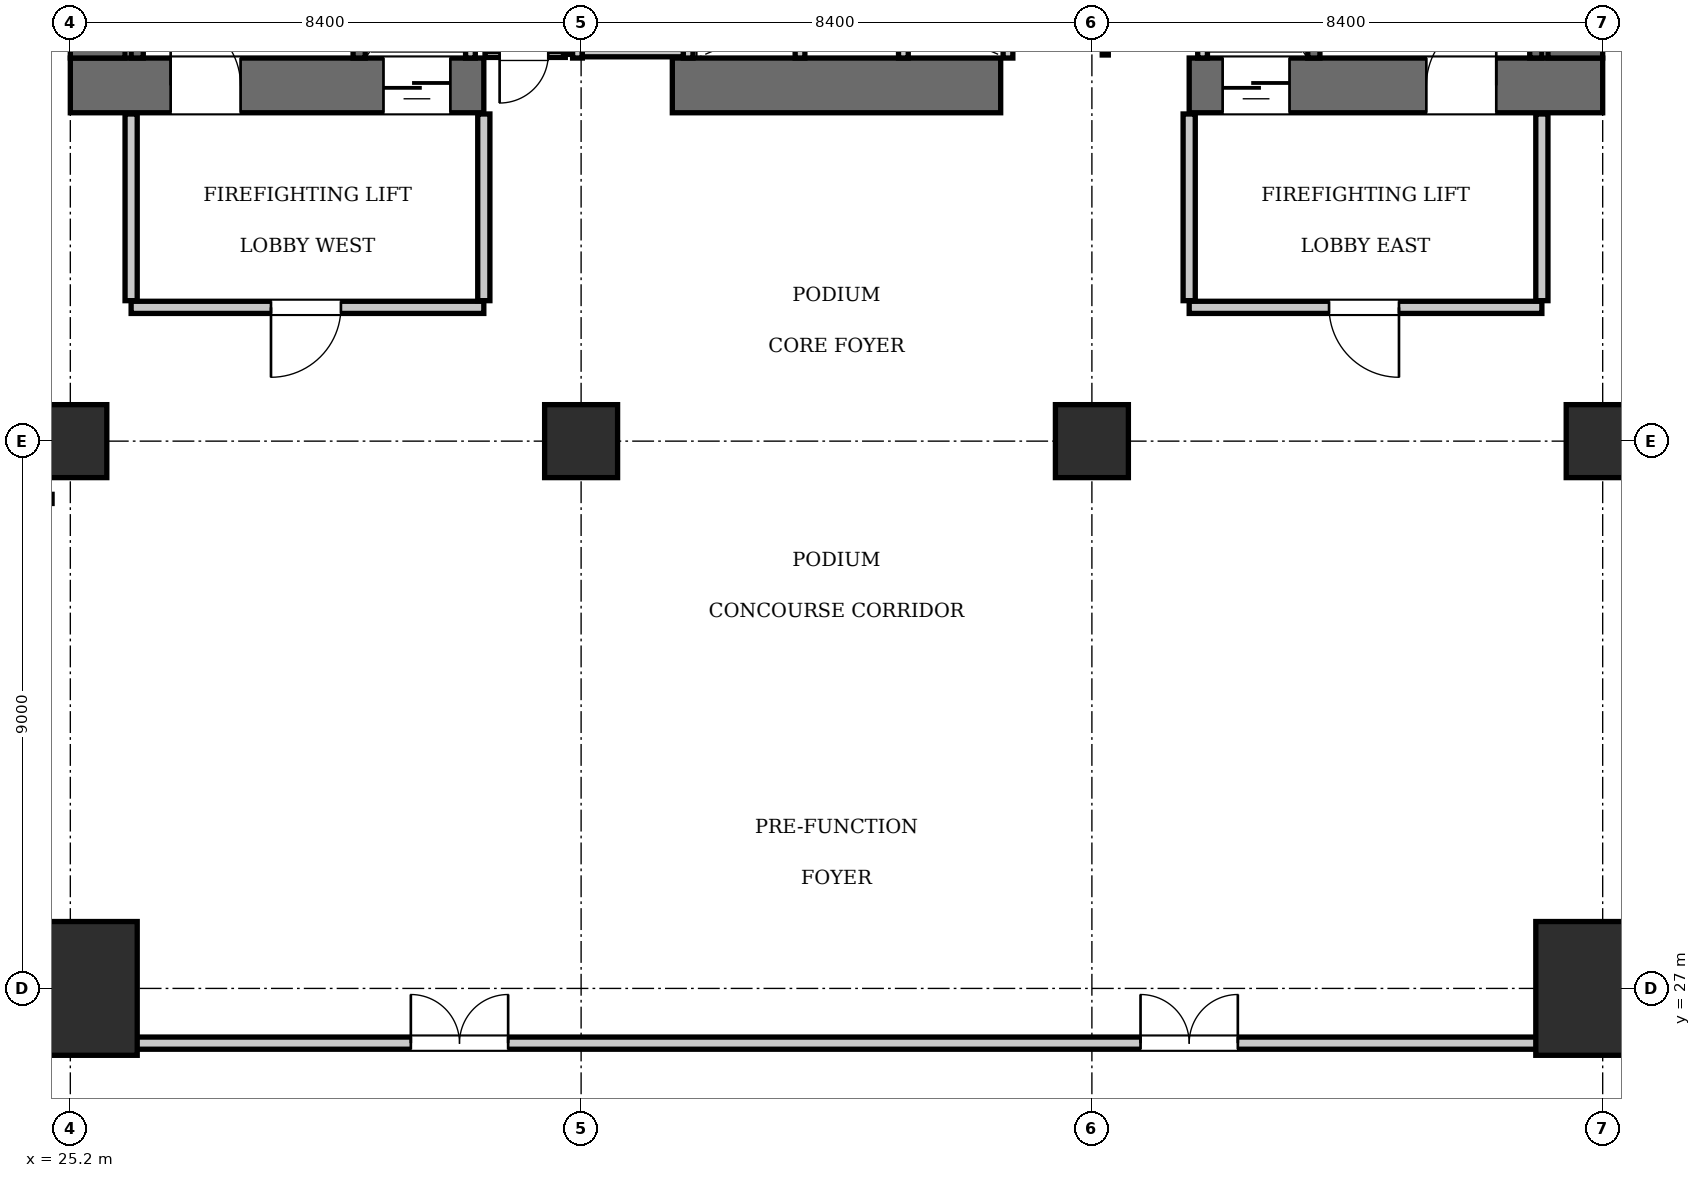
"""IFC4 building model, lengths in metres.
Left out: names, types, materials, properties, quantities, classifications, styles, units other than length and angle.
Written with IfcOpenShell. Run it as: python <this file> out.ifc"""

import sys

from ifc_helpers import new_model, si_unit, direction, frame, frame_2d, origin, origin_2d, place, context, subcontext, project, spatial, rectangle, extrude, element, fill, save


model = new_model("IFC4")
c1 = context("Model", 3, precision=1e-05, world=origin(), true_north=direction((0.0, 1.0)))
c2 = subcontext(c1, "Body", "Model", "MODEL_VIEW")
j1 = project(units=[si_unit("LENGTHUNIT", "METRE"), si_unit("PLANEANGLEUNIT", "RADIAN")], contexts=[c1])
p1 = place(None, origin())
s1 = spatial("IfcSite", under=j1, at=p1, CompositionType="ELEMENT")
p2 = place(p1, origin())
s2 = spatial("IfcBuilding", under=s1, at=p2, CompositionType="ELEMENT")
p3 = place(p2, frame((0.0, 0.0, 5.6)))
s3 = spatial("IfcBuildingStorey", under=s2, at=p3, CompositionType="ELEMENT", Elevation=5.6)
for number, where, z_axis, x_axis in (
    (1, (25.2, 27.0, 0.0), (0.0, 0.0, 1.0), (1.0, 0.0, 0.0)),
    (2, (50.4, 27.0, 0.0), (0.0, 0.0, 1.0), (1.0, 0.0, 0.0)),
):
    element("IfcColumn", number, at=place(p3, frame(where, z_axis=z_axis, x_axis=x_axis)), inside=s3, PredefinedType="COLUMN", context=c2, shape_type="SweptSolid", body=[
        extrude(rectangle(XDim=2.2, YDim=2.2, at=origin_2d()), origin(), (0.0, 0.0, 1.0), 5.25),
    ])
p4 = place(p3, frame((25.2, 41.85, 0.0), z_axis=(0.0, 0.0, 1.0), x_axis=(1.0, 0.0, 0.0)))
e3 = element("IfcWall", 3, at=p4, inside=s3, PredefinedType="SHEAR", context=c2, shape_type="SweptSolid", body=[
    extrude(rectangle(XDim=6.8, YDim=0.9, at=frame_2d((3.4, 0.0))), origin(), (0.0, 0.0, 1.0), 5.25),
])
p5 = place(p4, frame((1.65, 0.0, 0.0)))
e4 = element("IfcOpeningElement", 4, at=p5, cuts=e3, PredefinedType="OPENING", context=c2, shape_type="SweptSolid", body=[
    extrude(rectangle(XDim=1.15, YDim=2.15, at=frame_2d((0.575, 1.075))), frame((0.0, 0.46, 0.0), z_axis=(0.0, -1.0, 0.0), x_axis=(1.0, 0.0, 0.0)), (0.0, 0.0, 1.0), 0.92),
])
p6 = place(p4, frame((5.15, 0.0, 0.0)))
e5 = element("IfcOpeningElement", 5, at=p6, cuts=e3, PredefinedType="OPENING", context=c2, shape_type="SweptSolid", body=[
    extrude(rectangle(XDim=1.1, YDim=2.2, at=frame_2d((0.55, 1.1))), frame((0.0, 0.46, 0.0), z_axis=(0.0, -1.0, 0.0), x_axis=(1.0, 0.0, 0.0)), (0.0, 0.0, 1.0), 0.92),
])
p7 = place(p3, frame((35.1, 41.85, 0.0), z_axis=(0.0, 0.0, 1.0), x_axis=(1.0, 0.0, 0.0)))
e6 = element("IfcWall", 6, at=p7, inside=s3, PredefinedType="SHEAR", context=c2, shape_type="SweptSolid", body=[
    extrude(rectangle(XDim=5.4, YDim=0.9, at=frame_2d((2.7, 0.0))), origin(), (0.0, 0.0, 1.0), 5.25),
])
p8 = place(p3, frame((43.6, 41.85, 0.0), z_axis=(0.0, 0.0, 1.0), x_axis=(1.0, 0.0, 0.0)))
e7 = element("IfcWall", 7, at=p8, inside=s3, PredefinedType="SHEAR", context=c2, shape_type="SweptSolid", body=[
    extrude(rectangle(XDim=6.8, YDim=0.9, at=frame_2d((3.4, 0.0))), origin(), (0.0, 0.0, 1.0), 5.25),
])
p9 = place(p8, frame((3.9, 0.0, 0.0)))
e8 = element("IfcOpeningElement", 8, at=p9, cuts=e7, PredefinedType="OPENING", context=c2, shape_type="SweptSolid", body=[
    extrude(rectangle(XDim=1.15, YDim=2.15, at=frame_2d((0.575, 1.075))), frame((0.0, 0.46, 0.0), z_axis=(0.0, -1.0, 0.0), x_axis=(1.0, 0.0, 0.0)), (0.0, 0.0, 1.0), 0.92),
])
p10 = place(p8, frame((0.55, 0.0, 0.0)))
e9 = element("IfcOpeningElement", 9, at=p10, cuts=e7, PredefinedType="OPENING", context=c2, shape_type="SweptSolid", body=[
    extrude(rectangle(XDim=1.1, YDim=2.2, at=frame_2d((0.55, 1.1))), frame((0.0, 0.46, 0.0), z_axis=(0.0, -1.0, 0.0), x_axis=(1.0, 0.0, 0.0)), (0.0, 0.0, 1.0), 0.92),
])
for number, where, z_axis, x_axis in (
    (10, (25.65, 42.3, 0.0), (0.0, 0.0, 1.0), (0.0, 1.0, 0.0)),
    (11, (49.95, 42.3, 0.0), (0.0, 0.0, 1.0), (0.0, 1.0, 0.0)),
):
    element("IfcWall", number, at=place(p3, frame(where, z_axis=z_axis, x_axis=x_axis)), inside=s3, PredefinedType="SHEAR", context=c2, shape_type="SweptSolid", body=[
        extrude(rectangle(XDim=1.6, YDim=0.9, at=frame_2d((0.8, 0.0))), origin(), (0.0, 0.0, 1.0), 5.25),
    ])
for number, where, z_axis, x_axis in (
    (12, (25.2, 36.0, 0.0), (0.0, 0.0, 1.0), (1.0, 0.0, 0.0)),
    (13, (33.6, 36.0, 0.0), (0.0, 0.0, 1.0), (1.0, 0.0, 0.0)),
    (14, (42.0, 36.0, 0.0), (0.0, 0.0, 1.0), (1.0, 0.0, 0.0)),
    (15, (50.4, 36.0, 0.0), (0.0, 0.0, 1.0), (1.0, 0.0, 0.0)),
):
    element("IfcColumn", number, at=place(p3, frame(where, z_axis=z_axis, x_axis=x_axis)), inside=s3, PredefinedType="COLUMN", context=c2, shape_type="SweptSolid", body=[
        extrude(rectangle(XDim=1.2, YDim=1.2, at=origin_2d()), origin(), (0.0, 0.0, 1.0), 5.25),
    ])
p11 = place(p3, frame((29.95, 42.3, 0.0), z_axis=(0.0, 0.0, 1.0), x_axis=(0.0, 1.0, 0.0)))
e16 = element("IfcWall", 16, at=p11, inside=s3, PredefinedType="SOLIDWALL", context=c2, shape_type="SweptSolid", body=[
    extrude(rectangle(XDim=8.85, YDim=0.2, at=frame_2d((4.425, 0.0))), origin(), (0.0, 0.0, 1.0), 4.97),
])
p12 = place(p3, frame((26.3, 42.3, 0.0), z_axis=(0.0, 0.0, 1.0), x_axis=(0.0, 1.0, 0.0)))
e17 = element("IfcWall", 17, at=p12, inside=s3, PredefinedType="SOLIDWALL", context=c2, shape_type="SweptSolid", body=[
    extrude(rectangle(XDim=1.58, YDim=0.2, at=frame_2d((0.79, 0.0))), origin(), (0.0, 0.0, 1.0), 4.97),
])
p13 = place(p3, frame((45.65, 42.3, 0.0), z_axis=(0.0, 0.0, 1.0), x_axis=(0.0, 1.0, 0.0)))
e18 = element("IfcWall", 18, at=p13, inside=s3, PredefinedType="SOLIDWALL", context=c2, shape_type="SweptSolid", body=[
    extrude(rectangle(XDim=8.85, YDim=0.2, at=frame_2d((4.425, 0.0))), origin(), (0.0, 0.0, 1.0), 4.97),
])
p14 = place(p3, frame((49.3, 42.3, 0.0), z_axis=(0.0, 0.0, 1.0), x_axis=(0.0, 1.0, 0.0)))
e19 = element("IfcWall", 19, at=p14, inside=s3, PredefinedType="SOLIDWALL", context=c2, shape_type="SweptSolid", body=[
    extrude(rectangle(XDim=1.58, YDim=0.2, at=frame_2d((0.79, 0.0))), origin(), (0.0, 0.0, 1.0), 4.97),
])
for number, where, z_axis, x_axis in (
    (20, (31.78, 42.3, 0.0), (0.0, 0.0, 1.0), (0.0, 1.0, 0.0)),
    (21, (43.82, 42.3, 0.0), (0.0, 0.0, 1.0), (0.0, 1.0, 0.0)),
):
    element("IfcWall", number, at=place(p3, frame(where, z_axis=z_axis, x_axis=x_axis)), inside=s3, PredefinedType="SOLIDWALL", context=c2, shape_type="SweptSolid", body=[
        extrude(rectangle(XDim=2.44, YDim=0.16, at=frame_2d((1.22, 0.0))), origin(), (0.0, 0.0, 1.0), 4.97),
    ])
for number, where, z_axis, x_axis in (
    (22, (37.2, 42.3, 0.0), (0.0, 0.0, 1.0), (0.0, 1.0, 0.0)),
    (23, (38.9, 42.3, 0.0), (0.0, 0.0, 1.0), (0.0, 1.0, 0.0)),
    (24, (40.62, 42.3, 0.0), (0.0, 0.0, 1.0), (0.0, 1.0, 0.0)),
):
    element("IfcWall", number, at=place(p3, frame(where, z_axis=z_axis, x_axis=x_axis)), inside=s3, PredefinedType="SOLIDWALL", context=c2, shape_type="SweptSolid", body=[
        extrude(rectangle(XDim=2.05, YDim=0.16, at=frame_2d((1.025, 0.0))), origin(), (0.0, 0.0, 1.0), 4.97),
    ])
for number, where, z_axis, x_axis in (
    (25, (33.54, 42.3, 0.0), (0.0, 0.0, 1.0), (0.0, 1.0, 0.0)),
    (26, (35.36, 42.3, 0.0), (0.0, 0.0, 1.0), (0.0, 1.0, 0.0)),
):
    element("IfcWall", number, at=place(p3, frame(where, z_axis=z_axis, x_axis=x_axis)), inside=s3, PredefinedType="SOLIDWALL", context=c2, shape_type="SweptSolid", body=[
        extrude(rectangle(XDim=2.1, YDim=0.16, at=frame_2d((1.05, 0.0))), origin(), (0.0, 0.0, 1.0), 4.97),
    ])
p15 = place(p3, frame((33.62, 42.4, 0.0), z_axis=(0.0, 0.0, 1.0), x_axis=(1.0, 0.0, 0.0)))
e27 = element("IfcWall", 27, at=p15, inside=s3, PredefinedType="SOLIDWALL", context=c2, shape_type="SweptSolid", body=[
    extrude(rectangle(XDim=1.66, YDim=0.16, at=frame_2d((0.83, 0.0))), origin(), (0.0, 0.0, 1.0), 4.97),
])
p16 = place(p3, frame((26.2, 38.2, 0.0), z_axis=(0.0, 0.0, 1.0), x_axis=(1.0, 0.0, 0.0)))
e28 = element("IfcWall", 28, at=p16, inside=s3, PredefinedType="PARTITIONING", context=c2, shape_type="SweptSolid", body=[
    extrude(rectangle(XDim=5.8, YDim=0.2, at=frame_2d((2.9, 0.0))), origin(), (0.0, 0.0, 1.0), 4.97),
])
p17 = place(p16, frame((2.3, 0.0, 0.0)))
e29 = element("IfcOpeningElement", 29, at=p17, cuts=e28, PredefinedType="OPENING", context=c2, shape_type="SweptSolid", body=[
    extrude(rectangle(XDim=1.15, YDim=2.15, at=frame_2d((0.575, 1.075))), frame((0.0, 0.11, 0.0), z_axis=(0.0, -1.0, 0.0), x_axis=(1.0, 0.0, 0.0)), (0.0, 0.0, 1.0), 0.22),
])
for number, where, z_axis, x_axis in (
    (30, (26.2, 38.31, 0.0), (0.0, 0.0, 1.0), (0.0, 1.0, 0.0)),
    (31, (32.0, 38.31, 0.0), (0.0, 0.0, 1.0), (0.0, 1.0, 0.0)),
):
    element("IfcWall", number, at=place(p3, frame(where, z_axis=z_axis, x_axis=x_axis)), inside=s3, PredefinedType="PARTITIONING", context=c2, shape_type="SweptSolid", body=[
        extrude(rectangle(XDim=3.07, YDim=0.2, at=frame_2d((1.535, 0.0))), origin(), (0.0, 0.0, 1.0), 4.97),
    ])
p18 = place(p3, frame((43.6, 38.2, 0.0), z_axis=(0.0, 0.0, 1.0), x_axis=(1.0, 0.0, 0.0)))
e32 = element("IfcWall", 32, at=p18, inside=s3, PredefinedType="PARTITIONING", context=c2, shape_type="SweptSolid", body=[
    extrude(rectangle(XDim=5.8, YDim=0.2, at=frame_2d((2.9, 0.0))), origin(), (0.0, 0.0, 1.0), 4.97),
])
p19 = place(p18, frame((2.3, 0.0, 0.0)))
e33 = element("IfcOpeningElement", 33, at=p19, cuts=e32, PredefinedType="OPENING", context=c2, shape_type="SweptSolid", body=[
    extrude(rectangle(XDim=1.15, YDim=2.15, at=frame_2d((0.575, 1.075))), frame((0.0, 0.11, 0.0), z_axis=(0.0, -1.0, 0.0), x_axis=(1.0, 0.0, 0.0)), (0.0, 0.0, 1.0), 0.22),
])
for number, where, z_axis, x_axis in (
    (34, (43.6, 38.31, 0.0), (0.0, 0.0, 1.0), (0.0, 1.0, 0.0)),
    (35, (49.4, 38.31, 0.0), (0.0, 0.0, 1.0), (0.0, 1.0, 0.0)),
):
    element("IfcWall", number, at=place(p3, frame(where, z_axis=z_axis, x_axis=x_axis)), inside=s3, PredefinedType="PARTITIONING", context=c2, shape_type="SweptSolid", body=[
        extrude(rectangle(XDim=3.07, YDim=0.2, at=frame_2d((1.535, 0.0))), origin(), (0.0, 0.0, 1.0), 4.97),
    ])
p20 = place(p3, frame((32.02, 42.36, 0.0), z_axis=(0.0, 0.0, 1.0), x_axis=(1.0, 0.0, 0.0)))
e36 = element("IfcWall", 36, at=p20, inside=s3, PredefinedType="PARTITIONING", context=c2, shape_type="SweptSolid", body=[
    extrude(rectangle(XDim=1.32, YDim=0.1, at=frame_2d((0.66, 0.0))), origin(), (0.0, 0.0, 1.0), 4.97),
])
p21 = place(p20, frame((0.24, 0.0, 0.0)))
e37 = element("IfcOpeningElement", 37, at=p21, cuts=e36, PredefinedType="OPENING", context=c2, shape_type="SweptSolid", body=[
    extrude(rectangle(XDim=0.8, YDim=2.05, at=frame_2d((0.4, 1.025))), frame((0.0, 0.06, 0.0), z_axis=(0.0, -1.0, 0.0), x_axis=(1.0, 0.0, 0.0)), (0.0, 0.0, 1.0), 0.12),
])
p22 = place(p3, frame((33.36, 42.36, 0.0), z_axis=(0.0, 0.0, 1.0), x_axis=(0.0, 1.0, 0.0)))
e38 = element("IfcWall", 38, at=p22, inside=s3, PredefinedType="PARTITIONING", context=c2, shape_type="SweptSolid", body=[
    extrude(rectangle(XDim=2.58, YDim=0.1, at=frame_2d((1.29, 0.0))), origin(), (0.0, 0.0, 1.0), 4.97),
])
p23 = place(p3, frame((42.22, 42.35, 0.0), z_axis=(0.0, 0.0, 1.0), x_axis=(0.0, 1.0, 0.0)))
e39 = element("IfcWall", 39, at=p23, inside=s3, PredefinedType="PARTITIONING", context=c2, shape_type="SweptSolid", body=[
    extrude(rectangle(XDim=2.61, YDim=0.1, at=frame_2d((1.305, 0.0))), origin(), (0.0, 0.0, 1.0), 4.97),
])
p24 = place(p23, frame((0.65, 0.0, 0.0)))
e40 = element("IfcOpeningElement", 40, at=p24, cuts=e39, PredefinedType="OPENING", context=c2, shape_type="SweptSolid", body=[
    extrude(rectangle(XDim=0.8, YDim=2.05, at=frame_2d((0.4, 1.025))), frame((0.0, 0.06, 0.0), z_axis=(0.0, -1.0, 0.0), x_axis=(1.0, 0.0, 0.0)), (0.0, 0.0, 1.0), 0.12),
])
p25 = place(p3, frame((25.8, 26.1, 0.0), z_axis=(0.0, 0.0, 1.0), x_axis=(1.0, 0.0, 0.0)))
e41 = element("IfcWall", 41, at=p25, inside=s3, PredefinedType="PARTITIONING", context=c2, shape_type="SweptSolid", body=[
    extrude(rectangle(XDim=24.0, YDim=0.2, at=frame_2d((12.0, 0.0))), origin(), (0.0, 0.0, 1.0), 4.97),
])
p26 = place(p25, frame((5.0, 0.0, 0.0)))
e42 = element("IfcOpeningElement", 42, at=p26, cuts=e41, PredefinedType="OPENING", context=c2, shape_type="SweptSolid", body=[
    extrude(rectangle(XDim=1.6, YDim=2.3, at=frame_2d((0.8, 1.15))), frame((0.0, 0.11, 0.0), z_axis=(0.0, -1.0, 0.0), x_axis=(1.0, 0.0, 0.0)), (0.0, 0.0, 1.0), 0.22),
])
p27 = place(p25, frame((17.0, 0.0, 0.0)))
e43 = element("IfcOpeningElement", 43, at=p27, cuts=e41, PredefinedType="OPENING", context=c2, shape_type="SweptSolid", body=[
    extrude(rectangle(XDim=1.6, YDim=2.3, at=frame_2d((0.8, 1.15))), frame((0.0, 0.11, 0.0), z_axis=(0.0, -1.0, 0.0), x_axis=(1.0, 0.0, 0.0)), (0.0, 0.0, 1.0), 0.22),
])
p28 = place(p5, origin())
e44 = element("IfcDoor", 44, at=p28, inside=s3, OperationType="SINGLE_SWING_LEFT", PredefinedType="DOOR", context=c2, shape_type="SweptSolid", body=[
    extrude(rectangle(XDim=1.15, YDim=2.15, at=frame_2d((0.575, 1.075))), frame((0.0, 0.025, 0.0), z_axis=(0.0, -1.0, 0.0), x_axis=(1.0, 0.0, 0.0)), (0.0, 0.0, 1.0), 0.05),
])
fill(e4, e44)
p29 = place(p9, origin())
e45 = element("IfcDoor", 45, at=p29, inside=s3, OperationType="SINGLE_SWING_RIGHT", PredefinedType="DOOR", context=c2, shape_type="SweptSolid", body=[
    extrude(rectangle(XDim=1.15, YDim=2.15, at=frame_2d((0.575, 1.075))), frame((0.0, 0.025, 0.0), z_axis=(0.0, -1.0, 0.0), x_axis=(1.0, 0.0, 0.0)), (0.0, 0.0, 1.0), 0.05),
])
fill(e8, e45)
p30 = place(p6, frame((1.1, 0.0, 0.0), z_axis=(0.0, 0.0, 1.0), x_axis=(-1.0, 0.0, 0.0)))
e46 = element("IfcDoor", 46, at=p30, inside=s3, OperationType="SLIDING_TO_LEFT", PredefinedType="DOOR", context=c2, shape_type="SweptSolid", body=[
    extrude(rectangle(XDim=1.1, YDim=2.2, at=frame_2d((0.55, 1.1))), frame((0.0, 0.025, 0.0), z_axis=(0.0, -1.0, 0.0), x_axis=(1.0, 0.0, 0.0)), (0.0, 0.0, 1.0), 0.05),
])
fill(e5, e46)
p31 = place(p10, frame((1.1, 0.0, 0.0), z_axis=(0.0, 0.0, 1.0), x_axis=(-1.0, 0.0, 0.0)))
e47 = element("IfcDoor", 47, at=p31, inside=s3, OperationType="SLIDING_TO_LEFT", PredefinedType="DOOR", context=c2, shape_type="SweptSolid", body=[
    extrude(rectangle(XDim=1.1, YDim=2.2, at=frame_2d((0.55, 1.1))), frame((0.0, 0.025, 0.0), z_axis=(0.0, -1.0, 0.0), x_axis=(1.0, 0.0, 0.0)), (0.0, 0.0, 1.0), 0.05),
])
fill(e9, e47)
p32 = place(p17, frame((1.15, 0.0, 0.0), z_axis=(0.0, 0.0, 1.0), x_axis=(-1.0, 0.0, 0.0)))
e48 = element("IfcDoor", 48, at=p32, inside=s3, OperationType="SINGLE_SWING_RIGHT", PredefinedType="DOOR", context=c2, shape_type="SweptSolid", body=[
    extrude(rectangle(XDim=1.15, YDim=2.15, at=frame_2d((0.575, 1.075))), frame((0.0, 0.025, 0.0), z_axis=(0.0, -1.0, 0.0), x_axis=(1.0, 0.0, 0.0)), (0.0, 0.0, 1.0), 0.05),
])
fill(e29, e48)
p33 = place(p19, frame((1.15, 0.0, 0.0), z_axis=(0.0, 0.0, 1.0), x_axis=(-1.0, 0.0, 0.0)))
e49 = element("IfcDoor", 49, at=p33, inside=s3, OperationType="SINGLE_SWING_LEFT", PredefinedType="DOOR", context=c2, shape_type="SweptSolid", body=[
    extrude(rectangle(XDim=1.15, YDim=2.15, at=frame_2d((0.575, 1.075))), frame((0.0, 0.025, 0.0), z_axis=(0.0, -1.0, 0.0), x_axis=(1.0, 0.0, 0.0)), (0.0, 0.0, 1.0), 0.05),
])
fill(e33, e49)
p34 = place(p21, frame((0.8, 0.0, 0.0), z_axis=(0.0, 0.0, 1.0), x_axis=(-1.0, 0.0, 0.0)))
e50 = element("IfcDoor", 50, at=p34, inside=s3, OperationType="SINGLE_SWING_RIGHT", PredefinedType="DOOR", context=c2, shape_type="SweptSolid", body=[
    extrude(rectangle(XDim=0.8, YDim=2.05, at=frame_2d((0.4, 1.025))), frame((0.0, 0.025, 0.0), z_axis=(0.0, -1.0, 0.0), x_axis=(1.0, 0.0, 0.0)), (0.0, 0.0, 1.0), 0.05),
])
fill(e37, e50)
p35 = place(p26, origin())
e51 = element("IfcDoor", 51, at=p35, inside=s3, OperationType="DOUBLE_DOOR_SINGLE_SWING", PredefinedType="DOOR", context=c2, shape_type="SweptSolid", body=[
    extrude(rectangle(XDim=1.6, YDim=2.3, at=frame_2d((0.8, 1.15))), frame((0.0, 0.025, 0.0), z_axis=(0.0, -1.0, 0.0), x_axis=(1.0, 0.0, 0.0)), (0.0, 0.0, 1.0), 0.05),
])
fill(e42, e51)
p36 = place(p27, origin())
e52 = element("IfcDoor", 52, at=p36, inside=s3, OperationType="DOUBLE_DOOR_SINGLE_SWING", PredefinedType="DOOR", context=c2, shape_type="SweptSolid", body=[
    extrude(rectangle(XDim=1.6, YDim=2.3, at=frame_2d((0.8, 1.15))), frame((0.0, 0.025, 0.0), z_axis=(0.0, -1.0, 0.0), x_axis=(1.0, 0.0, 0.0)), (0.0, 0.0, 1.0), 0.05),
])
fill(e43, e52)
save(model, sys.argv[1])
